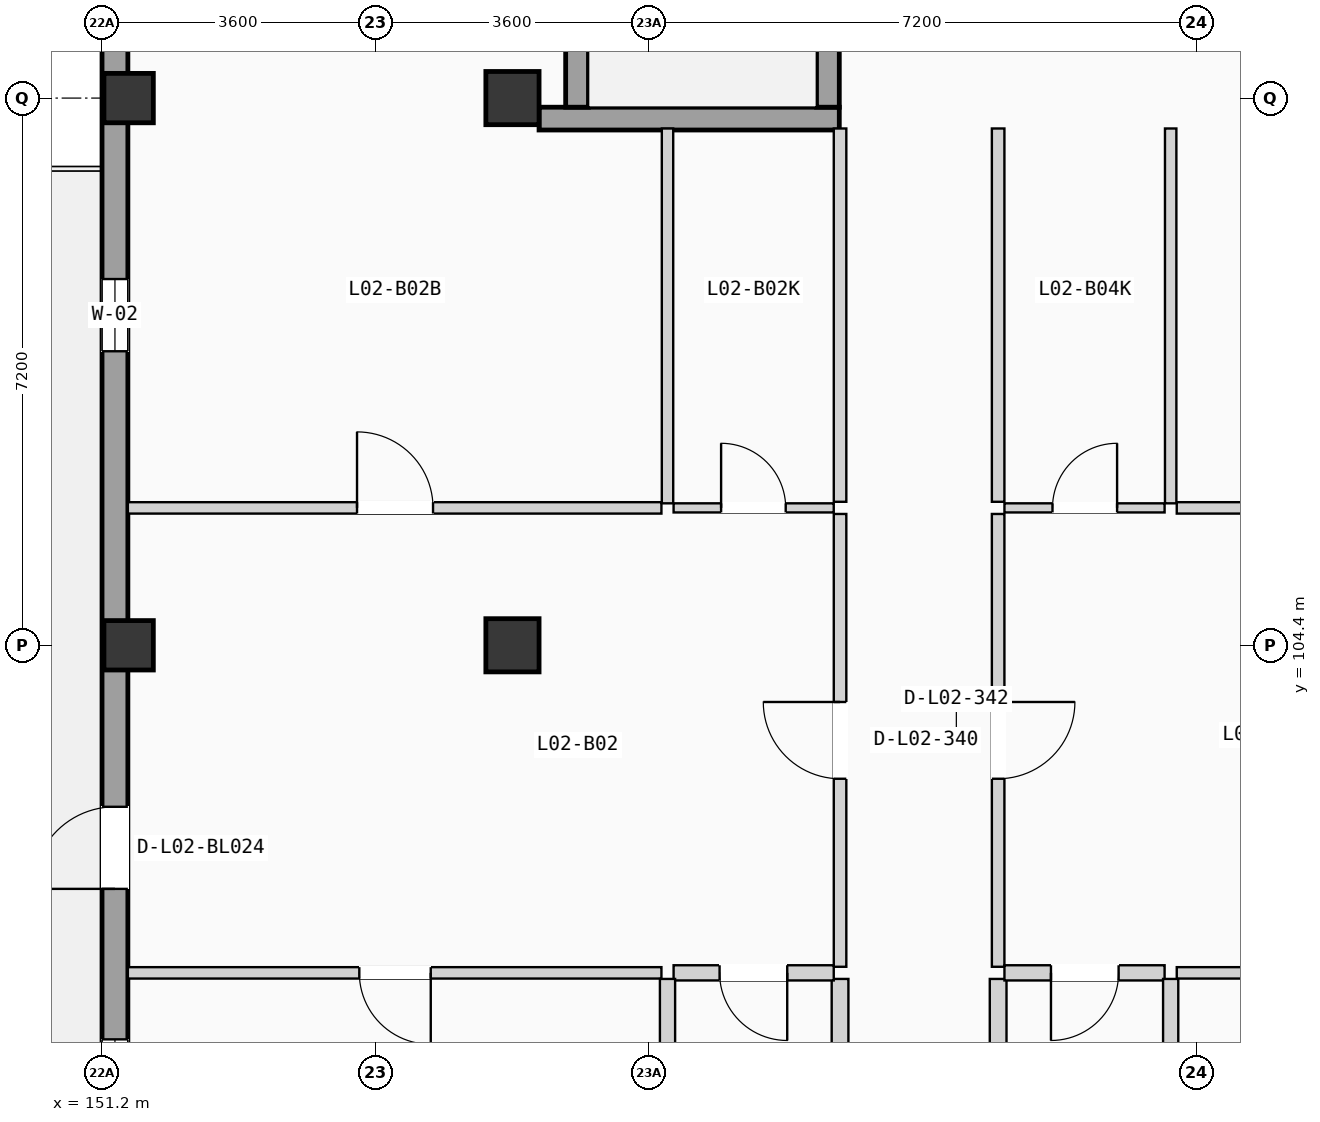
"""IFC4 building model, lengths in metres.
Left out: names, types, materials, properties, quantities, classifications, styles, units other than length and angle.
Written with IfcOpenShell. Run it as: python <this file> out.ifc"""

import sys

from ifc_helpers import new_model, si_unit, direction, frame, frame_2d, origin, origin_2d, place, context, subcontext, project, spatial, rectangle, extrude, element, fill, save


model = new_model("IFC4")
c1 = context("Model", 3, precision=1e-05, world=origin(), true_north=direction((0.0, 1.0)))
c2 = subcontext(c1, "Body", "Model", "MODEL_VIEW")
j1 = project(units=[si_unit("LENGTHUNIT", "METRE"), si_unit("PLANEANGLEUNIT", "RADIAN")], contexts=[c1])
p1 = place(None, origin())
s1 = spatial("IfcSite", under=j1, at=p1, CompositionType="ELEMENT")
p2 = place(p1, origin())
s2 = spatial("IfcBuilding", under=s1, at=p2, CompositionType="ELEMENT")
p3 = place(p2, frame((0.0, 0.0, 8.575)))
s3 = spatial("IfcBuildingStorey", under=s2, at=p3, CompositionType="ELEMENT", Elevation=8.575)
for number, where, z_axis, x_axis in (
    (1, (151.55, 104.4, 0.0), (0.0, 0.0, 1.0), (1.0, 0.0, 0.0)),
    (2, (151.55, 111.6, 0.0), (0.0, 0.0, 1.0), (1.0, 0.0, 0.0)),
):
    element("IfcColumn", number, at=place(p3, frame(where, z_axis=z_axis, x_axis=x_axis)), inside=s3, PredefinedType="COLUMN", context=c2, shape_type="SweptSolid", body=[
        extrude(rectangle(XDim=0.65, YDim=0.65, at=origin_2d()), origin(), (0.0, 0.0, 1.0), 3.5),
    ])
for number, where, z_axis, x_axis in (
    (3, (156.6, 104.4, 0.0), (0.0, 0.0, 1.0), (1.0, 0.0, 0.0)),
    (4, (156.6, 111.6, 0.0), (0.0, 0.0, 1.0), (1.0, 0.0, 0.0)),
):
    element("IfcColumn", number, at=place(p3, frame(where, z_axis=z_axis, x_axis=x_axis)), inside=s3, PredefinedType="COLUMN", context=c2, shape_type="SweptSolid", body=[
        extrude(rectangle(XDim=0.7, YDim=0.7, at=origin_2d()), origin(), (0.0, 0.0, 1.0), 3.5),
    ])
p4 = place(p3, frame((151.37, 68.74, 0.0), z_axis=(0.0, 0.0, 1.0), x_axis=(0.0, 1.0, 0.0)))
e5 = element("IfcWall", 5, at=p4, inside=s3, PredefinedType="SOLIDWALL", context=c2, shape_type="SweptSolid", body=[
    extrude(rectangle(XDim=49.72, YDim=0.34, at=frame_2d((24.86, 0.0))), origin(), (0.0, 0.0, 1.0), 3.24),
])
p5 = place(p4, frame((16.36, 0.0, 0.0)))
e6 = element("IfcOpeningElement", 6, at=p5, cuts=e5, PredefinedType="OPENING", context=c2, shape_type="SweptSolid", body=[
    extrude(rectangle(XDim=0.95, YDim=2.15, at=frame_2d((0.475, 1.075))), frame((0.0, 0.18, 0.0), z_axis=(0.0, -1.0, 0.0), x_axis=(1.0, 0.0, 0.0)), (0.0, 0.0, 1.0), 0.36),
])
p6 = place(p4, frame((9.002, 0.0, 0.9)))
e7 = element("IfcOpeningElement", 7, at=p6, cuts=e5, PredefinedType="OPENING", context=c2, shape_type="SweptSolid", body=[
    extrude(rectangle(XDim=2.3, YDim=1.65, at=frame_2d((1.15, 0.825))), frame((0.0, 0.18, 0.0), z_axis=(0.0, -1.0, 0.0), x_axis=(1.0, 0.0, 0.0)), (0.0, 0.0, 1.0), 0.36),
])
p7 = place(p4, frame((22.704, 0.0, 0.755)))
e8 = element("IfcOpeningElement", 8, at=p7, cuts=e5, PredefinedType="OPENING", context=c2, shape_type="SweptSolid", body=[
    extrude(rectangle(XDim=2.3, YDim=1.8, at=frame_2d((1.15, 0.9))), frame((0.0, 0.18, 0.0), z_axis=(0.0, -1.0, 0.0), x_axis=(1.0, 0.0, 0.0)), (0.0, 0.0, 1.0), 0.36),
])
p8 = place(p4, frame((32.455, 0.0, 0.0)))
e9 = element("IfcOpeningElement", 9, at=p8, cuts=e5, PredefinedType="OPENING", context=c2, shape_type="SweptSolid", body=[
    extrude(rectangle(XDim=1.08, YDim=2.18, at=frame_2d((0.54, 1.09))), frame((0.0, 0.18, 0.0), z_axis=(0.0, -1.0, 0.0), x_axis=(1.0, 0.0, 0.0)), (0.0, 0.0, 1.0), 0.36),
])
p9 = place(p4, frame((29.525, 0.0, 0.9)))
e10 = element("IfcOpeningElement", 10, at=p9, cuts=e5, PredefinedType="OPENING", context=c2, shape_type="SweptSolid", body=[
    extrude(rectangle(XDim=0.95, YDim=1.2, at=frame_2d((0.475, 0.6))), frame((0.0, 0.18, 0.0), z_axis=(0.0, -1.0, 0.0), x_axis=(1.0, 0.0, 0.0)), (0.0, 0.0, 1.0), 0.36),
])
p10 = place(p4, frame((39.529, 0.0, 0.9)))
e11 = element("IfcOpeningElement", 11, at=p10, cuts=e5, PredefinedType="OPENING", context=c2, shape_type="SweptSolid", body=[
    extrude(rectangle(XDim=0.95, YDim=1.35, at=frame_2d((0.475, 0.675))), frame((0.0, 0.18, 0.0), z_axis=(0.0, -1.0, 0.0), x_axis=(1.0, 0.0, 0.0)), (0.0, 0.0, 1.0), 0.36),
])
p11 = place(p3, frame((156.95, 111.33, 0.0), z_axis=(0.0, 0.0, 1.0), x_axis=(1.0, 0.0, 0.0)))
e12 = element("IfcWall", 12, at=p11, inside=s3, PredefinedType="SHEAR", context=c2, shape_type="SweptSolid", body=[
    extrude(rectangle(XDim=3.95, YDim=0.3, at=frame_2d((1.975, 0.0))), origin(), (0.0, 0.0, 1.0), 3.24),
])
p12 = place(p3, frame((157.45, 111.48, 0.0), z_axis=(0.0, 0.0, 1.0), x_axis=(0.0, 1.0, 0.0)))
e13 = element("IfcWall", 13, at=p12, inside=s3, PredefinedType="SHEAR", context=c2, shape_type="SweptSolid", body=[
    extrude(rectangle(XDim=7.0, YDim=0.3, at=frame_2d((3.5, 0.0))), origin(), (0.0, 0.0, 1.0), 3.24),
])
p13 = place(p3, frame((160.75, 111.48, 0.0), z_axis=(0.0, 0.0, 1.0), x_axis=(0.0, 1.0, 0.0)))
e14 = element("IfcWall", 14, at=p13, inside=s3, PredefinedType="SHEAR", context=c2, shape_type="SweptSolid", body=[
    extrude(rectangle(XDim=7.0, YDim=0.3, at=frame_2d((3.5, 0.0))), origin(), (0.0, 0.0, 1.0), 3.24),
])
p14 = place(p13, frame((5.625, 0.0, 0.0)))
e15 = element("IfcOpeningElement", 15, at=p14, cuts=e14, PredefinedType="OPENING", context=c2, shape_type="SweptSolid", body=[
    extrude(rectangle(XDim=1.15, YDim=2.12, at=frame_2d((0.575, 1.06))), frame((0.0, 0.16, 0.0), z_axis=(0.0, -1.0, 0.0), x_axis=(1.0, 0.0, 0.0)), (0.0, 0.0, 1.0), 0.32),
])
p15 = place(p3, frame((160.91, 100.17, 0.0), z_axis=(0.0, 0.0, 1.0), x_axis=(0.0, 1.0, 0.0)))
e16 = element("IfcWall", 16, at=p15, inside=s3, PredefinedType="PARTITIONING", context=c2, shape_type="SweptSolid", body=[
    extrude(rectangle(XDim=5.958, YDim=0.165, at=frame_2d((2.979, 0.0))), origin(), (0.0, 0.0, 1.0), 3.22),
])
p16 = place(p15, frame((2.474, 0.0, 0.0)))
e17 = element("IfcOpeningElement", 17, at=p16, cuts=e16, PredefinedType="OPENING", context=c2, shape_type="SweptSolid", body=[
    extrude(rectangle(XDim=1.01, YDim=2.11, at=frame_2d((0.505, 1.055))), frame((0.0, 0.093, 0.0), z_axis=(0.0, -1.0, 0.0), x_axis=(1.0, 0.0, 0.0)), (0.0, 0.0, 1.0), 0.185),
])
p17 = place(p3, frame((160.91, 95.098, 0.0), z_axis=(0.0, 0.0, 1.0), x_axis=(0.0, 1.0, 0.0)))
e18 = element("IfcWall", 18, at=p17, inside=s3, PredefinedType="PLUMBINGWALL", context=c2, shape_type="SweptSolid", body=[
    extrude(rectangle(XDim=4.912, YDim=0.22, at=frame_2d((2.456, 0.0))), origin(), (0.0, 0.0, 1.0), 3.22),
])
p18 = place(p3, frame((160.91, 106.288, 0.0), z_axis=(0.0, 0.0, 1.0), x_axis=(0.0, 1.0, 0.0)))
e19 = element("IfcWall", 19, at=p18, inside=s3, PredefinedType="PARTITIONING", context=c2, shape_type="SweptSolid", body=[
    extrude(rectangle(XDim=4.912, YDim=0.165, at=frame_2d((2.456, 0.0))), origin(), (0.0, 0.0, 1.0), 3.22),
])
p19 = place(p3, frame((162.99, 100.17, 0.0), z_axis=(0.0, 0.0, 1.0), x_axis=(0.0, 1.0, 0.0)))
e20 = element("IfcWall", 20, at=p19, inside=s3, PredefinedType="PARTITIONING", context=c2, shape_type="SweptSolid", body=[
    extrude(rectangle(XDim=5.958, YDim=0.165, at=frame_2d((2.979, 0.0))), origin(), (0.0, 0.0, 1.0), 3.22),
])
p20 = place(p19, frame((2.474, 0.0, 0.0)))
e21 = element("IfcOpeningElement", 21, at=p20, cuts=e20, PredefinedType="OPENING", context=c2, shape_type="SweptSolid", body=[
    extrude(rectangle(XDim=1.01, YDim=2.11, at=frame_2d((0.505, 1.055))), frame((0.0, 0.093, 0.0), z_axis=(0.0, -1.0, 0.0), x_axis=(1.0, 0.0, 0.0)), (0.0, 0.0, 1.0), 0.185),
])
p21 = place(p3, frame((162.99, 95.098, 0.0), z_axis=(0.0, 0.0, 1.0), x_axis=(0.0, 1.0, 0.0)))
e22 = element("IfcWall", 22, at=p21, inside=s3, PredefinedType="PLUMBINGWALL", context=c2, shape_type="SweptSolid", body=[
    extrude(rectangle(XDim=4.912, YDim=0.22, at=frame_2d((2.456, 0.0))), origin(), (0.0, 0.0, 1.0), 3.22),
])
p22 = place(p3, frame((162.99, 106.288, 0.0), z_axis=(0.0, 0.0, 1.0), x_axis=(0.0, 1.0, 0.0)))
e23 = element("IfcWall", 23, at=p22, inside=s3, PredefinedType="PARTITIONING", context=c2, shape_type="SweptSolid", body=[
    extrude(rectangle(XDim=4.912, YDim=0.165, at=frame_2d((2.456, 0.0))), origin(), (0.0, 0.0, 1.0), 3.22),
])
p23 = place(p3, frame((158.72, 100.09, 0.0), z_axis=(0.0, 0.0, 1.0), x_axis=(1.0, 0.0, 0.0)))
e24 = element("IfcWall", 24, at=p23, inside=s3, PredefinedType="PLUMBINGWALL", context=c2, shape_type="SweptSolid", body=[
    extrude(rectangle(XDim=2.107, YDim=0.2, at=frame_2d((1.053, 0.0))), origin(), (0.0, 0.0, 1.0), 3.22),
])
p24 = place(p23, frame((0.605, 0.0, 0.0)))
e25 = element("IfcOpeningElement", 25, at=p24, cuts=e24, PredefinedType="OPENING", context=c2, shape_type="SweptSolid", body=[
    extrude(rectangle(XDim=0.89, YDim=2.03, at=frame_2d((0.445, 1.015))), frame((0.0, 0.11, 0.0), z_axis=(0.0, -1.0, 0.0), x_axis=(1.0, 0.0, 0.0)), (0.0, 0.0, 1.0), 0.22),
])
p25 = place(p3, frame((158.72, 106.208, 0.0), z_axis=(0.0, 0.0, 1.0), x_axis=(1.0, 0.0, 0.0)))
e26 = element("IfcWall", 26, at=p25, inside=s3, PredefinedType="PARTITIONING", context=c2, shape_type="SweptSolid", body=[
    extrude(rectangle(XDim=2.107, YDim=0.12, at=frame_2d((1.053, 0.0))), origin(), (0.0, 0.0, 1.0), 3.22),
])
p26 = place(p25, frame((0.625, 0.0, 0.0)))
e27 = element("IfcOpeningElement", 27, at=p26, cuts=e26, PredefinedType="OPENING", context=c2, shape_type="SweptSolid", body=[
    extrude(rectangle(XDim=0.85, YDim=2.01, at=frame_2d((0.425, 1.005))), frame((0.0, 0.07, 0.0), z_axis=(0.0, -1.0, 0.0), x_axis=(1.0, 0.0, 0.0)), (0.0, 0.0, 1.0), 0.14),
])
p27 = place(p3, frame((151.54, 100.09, 0.0), z_axis=(0.0, 0.0, 1.0), x_axis=(1.0, 0.0, 0.0)))
e28 = element("IfcWall", 28, at=p27, inside=s3, PredefinedType="PARTITIONING", context=c2, shape_type="SweptSolid", body=[
    extrude(rectangle(XDim=7.02, YDim=0.15, at=frame_2d((3.51, 0.0))), origin(), (0.0, 0.0, 1.0), 3.22),
])
p28 = place(p27, frame((3.045, 0.0, 0.0)))
e29 = element("IfcOpeningElement", 29, at=p28, cuts=e28, PredefinedType="OPENING", context=c2, shape_type="SweptSolid", body=[
    extrude(rectangle(XDim=0.94, YDim=2.06, at=frame_2d((0.47, 1.03))), frame((0.0, 0.085, 0.0), z_axis=(0.0, -1.0, 0.0), x_axis=(1.0, 0.0, 0.0)), (0.0, 0.0, 1.0), 0.17),
])
p29 = place(p3, frame((151.54, 106.208, 0.0), z_axis=(0.0, 0.0, 1.0), x_axis=(1.0, 0.0, 0.0)))
e30 = element("IfcWall", 30, at=p29, inside=s3, PredefinedType="PARTITIONING", context=c2, shape_type="SweptSolid", body=[
    extrude(rectangle(XDim=7.02, YDim=0.15, at=frame_2d((3.51, 0.0))), origin(), (0.0, 0.0, 1.0), 3.22),
])
p30 = place(p29, frame((3.015, 0.0, 0.0)))
e31 = element("IfcOpeningElement", 31, at=p30, cuts=e30, PredefinedType="OPENING", context=c2, shape_type="SweptSolid", body=[
    extrude(rectangle(XDim=1.0, YDim=2.06, at=frame_2d((0.5, 1.03))), frame((0.0, 0.085, 0.0), z_axis=(0.0, -1.0, 0.0), x_axis=(1.0, 0.0, 0.0)), (0.0, 0.0, 1.0), 0.17),
])
p31 = place(p3, frame((158.64, 95.098, 0.0), z_axis=(0.0, 0.0, 1.0), x_axis=(0.0, 1.0, 0.0)))
e32 = element("IfcWall", 32, at=p31, inside=s3, PredefinedType="PLUMBINGWALL", context=c2, shape_type="SweptSolid", body=[
    extrude(rectangle(XDim=4.912, YDim=0.2, at=frame_2d((2.456, 0.0))), origin(), (0.0, 0.0, 1.0), 3.22),
])
p32 = place(p3, frame((158.64, 106.268, 0.0), z_axis=(0.0, 0.0, 1.0), x_axis=(0.0, 1.0, 0.0)))
e33 = element("IfcWall", 33, at=p32, inside=s3, PredefinedType="PARTITIONING", context=c2, shape_type="SweptSolid", body=[
    extrude(rectangle(XDim=4.932, YDim=0.15, at=frame_2d((2.466, 0.0))), origin(), (0.0, 0.0, 1.0), 3.22),
])
p33 = place(p3, frame((163.073, 100.09, 0.0), z_axis=(0.0, 0.0, 1.0), x_axis=(1.0, 0.0, 0.0)))
e34 = element("IfcWall", 34, at=p33, inside=s3, PredefinedType="PLUMBINGWALL", context=c2, shape_type="SweptSolid", body=[
    extrude(rectangle(XDim=2.107, YDim=0.2, at=frame_2d((1.053, 0.0))), origin(), (0.0, 0.0, 1.0), 3.22),
])
p34 = place(p33, frame((0.612, 0.0, 0.0)))
e35 = element("IfcOpeningElement", 35, at=p34, cuts=e34, PredefinedType="OPENING", context=c2, shape_type="SweptSolid", body=[
    extrude(rectangle(XDim=0.89, YDim=2.03, at=frame_2d((0.445, 1.015))), frame((0.0, 0.11, 0.0), z_axis=(0.0, -1.0, 0.0), x_axis=(1.0, 0.0, 0.0)), (0.0, 0.0, 1.0), 0.22),
])
p35 = place(p3, frame((163.073, 106.208, 0.0), z_axis=(0.0, 0.0, 1.0), x_axis=(1.0, 0.0, 0.0)))
e36 = element("IfcWall", 36, at=p35, inside=s3, PredefinedType="PARTITIONING", context=c2, shape_type="SweptSolid", body=[
    extrude(rectangle(XDim=2.107, YDim=0.12, at=frame_2d((1.053, 0.0))), origin(), (0.0, 0.0, 1.0), 3.22),
])
p36 = place(p35, frame((0.632, 0.0, 0.0)))
e37 = element("IfcOpeningElement", 37, at=p36, cuts=e36, PredefinedType="OPENING", context=c2, shape_type="SweptSolid", body=[
    extrude(rectangle(XDim=0.85, YDim=2.01, at=frame_2d((0.425, 1.005))), frame((0.0, 0.07, 0.0), z_axis=(0.0, -1.0, 0.0), x_axis=(1.0, 0.0, 0.0)), (0.0, 0.0, 1.0), 0.14),
])
p37 = place(p3, frame((165.34, 100.09, 0.0), z_axis=(0.0, 0.0, 1.0), x_axis=(1.0, 0.0, 0.0)))
e38 = element("IfcWall", 38, at=p37, inside=s3, PredefinedType="PARTITIONING", context=c2, shape_type="SweptSolid", body=[
    extrude(rectangle(XDim=7.12, YDim=0.15, at=frame_2d((3.56, 0.0))), origin(), (0.0, 0.0, 1.0), 3.22),
])
p38 = place(p37, frame((3.105, 0.0, 0.0)))
e39 = element("IfcOpeningElement", 39, at=p38, cuts=e38, PredefinedType="OPENING", context=c2, shape_type="SweptSolid", body=[
    extrude(rectangle(XDim=0.9, YDim=2.04, at=frame_2d((0.45, 1.02))), frame((0.0, 0.085, 0.0), z_axis=(0.0, -1.0, 0.0), x_axis=(1.0, 0.0, 0.0)), (0.0, 0.0, 1.0), 0.17),
])
p39 = place(p3, frame((165.34, 106.208, 0.0), z_axis=(0.0, 0.0, 1.0), x_axis=(1.0, 0.0, 0.0)))
e40 = element("IfcWall", 40, at=p39, inside=s3, PredefinedType="PARTITIONING", context=c2, shape_type="SweptSolid", body=[
    extrude(rectangle(XDim=7.12, YDim=0.15, at=frame_2d((3.56, 0.0))), origin(), (0.0, 0.0, 1.0), 3.22),
])
p40 = place(p39, frame((3.085, 0.0, 0.0)))
e41 = element("IfcOpeningElement", 41, at=p40, cuts=e40, PredefinedType="OPENING", context=c2, shape_type="SweptSolid", body=[
    extrude(rectangle(XDim=0.94, YDim=2.06, at=frame_2d((0.47, 1.03))), frame((0.0, 0.085, 0.0), z_axis=(0.0, -1.0, 0.0), x_axis=(1.0, 0.0, 0.0)), (0.0, 0.0, 1.0), 0.17),
])
p41 = place(p3, frame((165.26, 95.098, 0.0), z_axis=(0.0, 0.0, 1.0), x_axis=(0.0, 1.0, 0.0)))
e42 = element("IfcWall", 42, at=p41, inside=s3, PredefinedType="PLUMBINGWALL", context=c2, shape_type="SweptSolid", body=[
    extrude(rectangle(XDim=4.912, YDim=0.2, at=frame_2d((2.456, 0.0))), origin(), (0.0, 0.0, 1.0), 3.22),
])
p42 = place(p3, frame((165.26, 106.268, 0.0), z_axis=(0.0, 0.0, 1.0), x_axis=(0.0, 1.0, 0.0)))
e43 = element("IfcWall", 43, at=p42, inside=s3, PredefinedType="PARTITIONING", context=c2, shape_type="SweptSolid", body=[
    extrude(rectangle(XDim=4.932, YDim=0.15, at=frame_2d((2.466, 0.0))), origin(), (0.0, 0.0, 1.0), 3.22),
])
p43 = place(p8, origin())
e44 = element("IfcDoor", 44, at=p43, inside=s3, OperationType="SINGLE_SWING_LEFT", PredefinedType="DOOR", context=c2, shape_type="SweptSolid", body=[
    extrude(rectangle(XDim=1.08, YDim=2.18, at=frame_2d((0.54, 1.09))), frame((0.0, 0.025, 0.0), z_axis=(0.0, -1.0, 0.0), x_axis=(1.0, 0.0, 0.0)), (0.0, 0.0, 1.0), 0.05),
])
fill(e9, e44)
p44 = place(p9, origin())
e45 = element("IfcWindow", 45, at=p44, inside=s3, PartitioningType="SINGLE_PANEL", PredefinedType="WINDOW", context=c2, shape_type="SweptSolid", body=[
    extrude(rectangle(XDim=0.95, YDim=1.2, at=frame_2d((0.475, 0.6))), frame((0.0, 0.03, 0.0), z_axis=(0.0, -1.0, 0.0), x_axis=(1.0, 0.0, 0.0)), (0.0, 0.0, 1.0), 0.06),
])
fill(e10, e45)
p45 = place(p10, origin())
e46 = element("IfcWindow", 46, at=p45, inside=s3, PartitioningType="SINGLE_PANEL", PredefinedType="WINDOW", context=c2, shape_type="SweptSolid", body=[
    extrude(rectangle(XDim=0.95, YDim=1.35, at=frame_2d((0.475, 0.675))), frame((0.0, 0.03, 0.0), z_axis=(0.0, -1.0, 0.0), x_axis=(1.0, 0.0, 0.0)), (0.0, 0.0, 1.0), 0.06),
])
fill(e11, e46)
p46 = place(p16, origin())
e47 = element("IfcDoor", 47, at=p46, inside=s3, OperationType="SINGLE_SWING_RIGHT", PredefinedType="DOOR", context=c2, shape_type="SweptSolid", body=[
    extrude(rectangle(XDim=1.01, YDim=2.11, at=frame_2d((0.505, 1.055))), frame((0.0, 0.025, 0.0), z_axis=(0.0, -1.0, 0.0), x_axis=(1.0, 0.0, 0.0)), (0.0, 0.0, 1.0), 0.05),
])
fill(e17, e47)
p47 = place(p20, frame((1.01, 0.0, 0.0), z_axis=(0.0, 0.0, 1.0), x_axis=(-1.0, 0.0, 0.0)))
e48 = element("IfcDoor", 48, at=p47, inside=s3, OperationType="SINGLE_SWING_RIGHT", PredefinedType="DOOR", context=c2, shape_type="SweptSolid", body=[
    extrude(rectangle(XDim=1.01, YDim=2.11, at=frame_2d((0.505, 1.055))), frame((0.0, 0.025, 0.0), z_axis=(0.0, -1.0, 0.0), x_axis=(1.0, 0.0, 0.0)), (0.0, 0.0, 1.0), 0.05),
])
fill(e21, e48)
p48 = place(p24, frame((0.89, 0.0, 0.0), z_axis=(0.0, 0.0, 1.0), x_axis=(-1.0, 0.0, 0.0)))
e49 = element("IfcDoor", 49, at=p48, inside=s3, OperationType="SINGLE_SWING_RIGHT", PredefinedType="DOOR", context=c2, shape_type="SweptSolid", body=[
    extrude(rectangle(XDim=0.89, YDim=2.03, at=frame_2d((0.445, 1.015))), frame((0.0, 0.025, 0.0), z_axis=(0.0, -1.0, 0.0), x_axis=(1.0, 0.0, 0.0)), (0.0, 0.0, 1.0), 0.05),
])
fill(e25, e49)
p49 = place(p26, origin())
e50 = element("IfcDoor", 50, at=p49, inside=s3, OperationType="SINGLE_SWING_LEFT", PredefinedType="DOOR", context=c2, shape_type="SweptSolid", body=[
    extrude(rectangle(XDim=0.85, YDim=2.01, at=frame_2d((0.425, 1.005))), frame((0.0, 0.025, 0.0), z_axis=(0.0, -1.0, 0.0), x_axis=(1.0, 0.0, 0.0)), (0.0, 0.0, 1.0), 0.05),
])
fill(e27, e50)
p50 = place(p28, frame((0.94, 0.0, 0.0), z_axis=(0.0, 0.0, 1.0), x_axis=(-1.0, 0.0, 0.0)))
e51 = element("IfcDoor", 51, at=p50, inside=s3, OperationType="SINGLE_SWING_RIGHT", PredefinedType="DOOR", context=c2, shape_type="SweptSolid", body=[
    extrude(rectangle(XDim=0.94, YDim=2.06, at=frame_2d((0.47, 1.03))), frame((0.0, 0.025, 0.0), z_axis=(0.0, -1.0, 0.0), x_axis=(1.0, 0.0, 0.0)), (0.0, 0.0, 1.0), 0.05),
])
fill(e29, e51)
p51 = place(p30, origin())
e52 = element("IfcDoor", 52, at=p51, inside=s3, OperationType="SINGLE_SWING_LEFT", PredefinedType="DOOR", context=c2, shape_type="SweptSolid", body=[
    extrude(rectangle(XDim=1.0, YDim=2.06, at=frame_2d((0.5, 1.03))), frame((0.0, 0.025, 0.0), z_axis=(0.0, -1.0, 0.0), x_axis=(1.0, 0.0, 0.0)), (0.0, 0.0, 1.0), 0.05),
])
fill(e31, e52)
p52 = place(p34, frame((0.89, 0.0, 0.0), z_axis=(0.0, 0.0, 1.0), x_axis=(-1.0, 0.0, 0.0)))
e53 = element("IfcDoor", 53, at=p52, inside=s3, OperationType="SINGLE_SWING_LEFT", PredefinedType="DOOR", context=c2, shape_type="SweptSolid", body=[
    extrude(rectangle(XDim=0.89, YDim=2.03, at=frame_2d((0.445, 1.015))), frame((0.0, 0.025, 0.0), z_axis=(0.0, -1.0, 0.0), x_axis=(1.0, 0.0, 0.0)), (0.0, 0.0, 1.0), 0.05),
])
fill(e35, e53)
p53 = place(p36, origin())
e54 = element("IfcDoor", 54, at=p53, inside=s3, OperationType="SINGLE_SWING_RIGHT", PredefinedType="DOOR", context=c2, shape_type="SweptSolid", body=[
    extrude(rectangle(XDim=0.85, YDim=2.01, at=frame_2d((0.425, 1.005))), frame((0.0, 0.025, 0.0), z_axis=(0.0, -1.0, 0.0), x_axis=(1.0, 0.0, 0.0)), (0.0, 0.0, 1.0), 0.05),
])
fill(e37, e54)
save(model, sys.argv[1])
